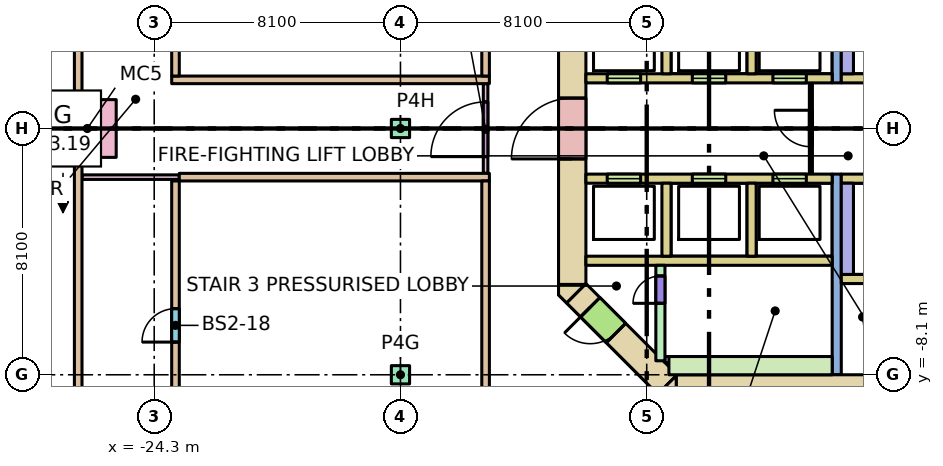
"""IFC4 building model, lengths in metres.
Left out: names, types, materials, properties, quantities, classifications, styles, units other than length and angle.
Written with IfcOpenShell. Run it as: python <this file> out.ifc"""

import sys

from ifc_helpers import new_model, si_unit, direction, frame, frame_2d, origin, origin_2d, place, context, subcontext, project, spatial, polyline, rectangle, outline, extrude, element, fill, save


model = new_model("IFC4")
c1 = context("Model", 3, precision=1e-05, world=origin(), true_north=direction((0.0, 1.0)))
c2 = subcontext(c1, "Body", "Model", "MODEL_VIEW")
j1 = project(units=[si_unit("LENGTHUNIT", "METRE"), si_unit("PLANEANGLEUNIT", "RADIAN")], contexts=[c1])
p1 = place(None, origin())
s1 = spatial("IfcSite", under=j1, at=p1, CompositionType="ELEMENT")
p2 = place(p1, origin())
s2 = spatial("IfcBuilding", under=s1, at=p2, CompositionType="ELEMENT")
p3 = place(p2, frame((0.0, 0.0, -7.2)))
s3 = spatial("IfcBuildingStorey", under=s2, at=p3, CompositionType="ELEMENT", Elevation=-7.2)
for number, where, z_axis, x_axis in (
    (1, (-16.2, -8.1, 0.0), (0.0, 0.0, 1.0), (1.0, 0.0, 0.0)),
    (2, (-16.2, 0.0, 0.0), (0.0, 0.0, 1.0), (1.0, 0.0, 0.0)),
):
    element("IfcColumn", number, at=place(p3, frame(where, z_axis=z_axis, x_axis=x_axis)), inside=s3, PredefinedType="COLUMN", context=c2, shape_type="SweptSolid", body=[
        extrude(rectangle(XDim=0.6, YDim=0.6, at=origin_2d()), origin(), (0.0, 0.0, 1.0), 3.6),
    ])
p4 = place(p3, frame((-26.5, 0.0, 0.0), z_axis=(0.0, 0.0, 1.0), x_axis=(0.0, -1.0, 0.0)))
e3 = element("IfcColumn", 3, at=p4, inside=s3, PredefinedType="COLUMN", context=c2, shape_type="SweptSolid", body=[
    extrude(rectangle(XDim=1.9, YDim=1.9, at=origin_2d()), origin(), (0.0, 0.0, 1.0), 3.6),
])
p5 = place(p3, frame((-7.13, -8.55, -0.32), z_axis=(0.0, 0.0, 1.0), x_axis=(1.0, 0.0, 0.0)))
e4 = element("IfcWall", 4, at=p5, inside=s3, PredefinedType="SHEAR", context=c2, shape_type="SweptSolid", body=[
    extrude(rectangle(XDim=14.26, YDim=0.9, at=frame_2d((7.13, 0.0))), origin(), (0.0, 0.0, 1.0), 3.6),
])
p6 = place(p5, frame((8.08, 0.0, 0.32)))
e5 = element("IfcOpeningElement", 5, at=p6, cuts=e4, PredefinedType="OPENING", context=c2, shape_type="SweptSolid", body=[
    extrude(rectangle(XDim=0.7, YDim=2.1, at=frame_2d((0.35, 1.05))), frame((0.0, 0.46, 0.0), z_axis=(0.0, -1.0, 0.0), x_axis=(1.0, 0.0, 0.0)), (0.0, 0.0, 1.0), 0.92),
])
p7 = place(p5, frame((6.205, 0.0, 0.32)))
e6 = element("IfcOpeningElement", 6, at=p7, cuts=e4, PredefinedType="OPENING", context=c2, shape_type="SweptSolid", body=[
    extrude(rectangle(XDim=0.9, YDim=2.1, at=frame_2d((0.45, 1.05))), frame((0.0, 0.46, 0.0), z_axis=(0.0, -1.0, 0.0), x_axis=(1.0, 0.0, 0.0)), (0.0, 0.0, 1.0), 0.92),
])
p8 = place(p5, frame((10.667, 0.0, 0.32)))
e7 = element("IfcOpeningElement", 7, at=p8, cuts=e4, PredefinedType="OPENING", context=c2, shape_type="SweptSolid", body=[
    extrude(rectangle(XDim=0.9, YDim=2.1, at=frame_2d((0.45, 1.05))), frame((0.0, 0.46, 0.0), z_axis=(0.0, -1.0, 0.0), x_axis=(1.0, 0.0, 0.0)), (0.0, 0.0, 1.0), 0.92),
])
p9 = place(p3, frame((-10.55, -5.13, -0.32), z_axis=(0.0, 0.0, 1.0), x_axis=(0.0, 1.0, 0.0)))
e8 = element("IfcWall", 8, at=p9, inside=s3, PredefinedType="SHEAR", context=c2, shape_type="SweptSolid", body=[
    extrude(rectangle(XDim=10.26, YDim=0.9, at=frame_2d((5.13, 0.0))), origin(), (0.0, 0.0, 1.0), 3.6),
])
p10 = place(p9, frame((4.13, 0.0, 0.32)))
e9 = element("IfcOpeningElement", 9, at=p10, cuts=e8, PredefinedType="OPENING", context=c2, shape_type="SweptSolid", body=[
    extrude(rectangle(XDim=2.0, YDim=2.1, at=frame_2d((1.0, 1.05))), frame((0.0, 0.46, 0.0), z_axis=(0.0, -1.0, 0.0), x_axis=(1.0, 0.0, 0.0)), (0.0, 0.0, 1.0), 0.92),
])
p11 = place(p3, frame((-7.418, -8.418, -0.32), z_axis=(0.0, 0.0, 1.0), x_axis=(-0.707106781187, 0.707106781187, 0.0)))
e10 = element("IfcWall", 10, at=p11, inside=s3, PredefinedType="SHEAR", context=c2, shape_type="SweptSolid", body=[
    extrude(rectangle(XDim=4.243, YDim=0.9, at=frame_2d((2.121, 0.0))), origin(), (0.0, 0.0, 1.0), 3.6),
])
p12 = place(p11, frame((2.393, 0.0, 0.32)))
e11 = element("IfcOpeningElement", 11, at=p12, cuts=e10, PredefinedType="OPENING", context=c2, shape_type="SweptSolid", body=[
    extrude(rectangle(XDim=1.2, YDim=2.1, at=frame_2d((0.6, 1.05))), frame((0.0, 0.46, 0.0), z_axis=(0.0, -1.0, 0.0), x_axis=(1.0, 0.0, 0.0)), (0.0, 0.0, 1.0), 0.92),
])
p13 = place(p3, frame((0.0, 0.0, -0.32)))
e12 = element("IfcWall", 12, at=p13, inside=s3, PredefinedType="SHEAR", context=c2, shape_type="SweptSolid", body=[
    extrude(outline(polyline([(-7.473, -9.0), (-7.736, -8.736), (-7.13, -8.13), (-7.13, -9.0), (-7.473, -9.0)])), origin(), (0.0, 0.0, 1.0), 3.6),
])
p14 = place(p3, frame((0.0, 0.0, -0.32)))
e13 = element("IfcWall", 13, at=p14, inside=s3, PredefinedType="SHEAR", context=c2, shape_type="SweptSolid", body=[
    extrude(outline(polyline([(-11.0, -5.473), (-11.0, -5.13), (-10.13, -5.13), (-10.736, -5.736), (-11.0, -5.473)])), origin(), (0.0, 0.0, 1.0), 3.6),
])
p15 = place(p3, frame((-10.1, -4.35, 0.0), z_axis=(0.0, 0.0, 1.0), x_axis=(1.0, 0.0, 0.0)))
e14 = element("IfcWall", 14, at=p15, inside=s3, PredefinedType="SOLIDWALL", context=c2, shape_type="SweptSolid", body=[
    extrude(rectangle(XDim=8.1, YDim=0.3, at=frame_2d((4.05, 0.0))), origin(), (0.0, 0.0, 1.0), 3.28),
])
p16 = place(p3, frame((-10.1, 1.65, 0.0), z_axis=(0.0, 0.0, 1.0), x_axis=(1.0, 0.0, 0.0)))
e15 = element("IfcWall", 15, at=p16, inside=s3, PredefinedType="SOLIDWALL", context=c2, shape_type="SweptSolid", body=[
    extrude(rectangle(XDim=8.1, YDim=0.3, at=frame_2d((4.05, 0.0))), origin(), (0.0, 0.0, 1.0), 3.28),
])
p17 = place(p16, frame((0.7, 0.0, 0.0)))
e16 = element("IfcOpeningElement", 16, at=p17, cuts=e15, PredefinedType="OPENING", context=c2, shape_type="SweptSolid", body=[
    extrude(rectangle(XDim=1.1, YDim=2.1, at=frame_2d((0.55, 1.05))), frame((0.0, 0.16, 0.0), z_axis=(0.0, -1.0, 0.0), x_axis=(1.0, 0.0, 0.0)), (0.0, 0.0, 1.0), 0.32),
])
p18 = place(p16, frame((3.5, 0.0, 0.0)))
e17 = element("IfcOpeningElement", 17, at=p18, cuts=e15, PredefinedType="OPENING", context=c2, shape_type="SweptSolid", body=[
    extrude(rectangle(XDim=1.1, YDim=2.1, at=frame_2d((0.55, 1.05))), frame((0.0, 0.16, 0.0), z_axis=(0.0, -1.0, 0.0), x_axis=(1.0, 0.0, 0.0)), (0.0, 0.0, 1.0), 0.32),
])
p19 = place(p16, frame((6.15, 0.0, 0.0)))
e18 = element("IfcOpeningElement", 18, at=p19, cuts=e15, PredefinedType="OPENING", context=c2, shape_type="SweptSolid", body=[
    extrude(rectangle(XDim=1.1, YDim=2.1, at=frame_2d((0.55, 1.05))), frame((0.0, 0.16, 0.0), z_axis=(0.0, -1.0, 0.0), x_axis=(1.0, 0.0, 0.0)), (0.0, 0.0, 1.0), 0.32),
])
p20 = place(p3, frame((-10.1, -1.65, 0.0), z_axis=(0.0, 0.0, 1.0), x_axis=(1.0, 0.0, 0.0)))
e19 = element("IfcWall", 19, at=p20, inside=s3, PredefinedType="SOLIDWALL", context=c2, shape_type="SweptSolid", body=[
    extrude(rectangle(XDim=8.1, YDim=0.3, at=frame_2d((4.05, 0.0))), origin(), (0.0, 0.0, 1.0), 3.28),
])
p21 = place(p20, frame((0.7, 0.0, 0.0)))
e20 = element("IfcOpeningElement", 20, at=p21, cuts=e19, PredefinedType="OPENING", context=c2, shape_type="SweptSolid", body=[
    extrude(rectangle(XDim=1.1, YDim=2.1, at=frame_2d((0.55, 1.05))), frame((0.0, 0.16, 0.0), z_axis=(0.0, -1.0, 0.0), x_axis=(1.0, 0.0, 0.0)), (0.0, 0.0, 1.0), 0.32),
])
p22 = place(p20, frame((3.5, 0.0, 0.0)))
e21 = element("IfcOpeningElement", 21, at=p22, cuts=e19, PredefinedType="OPENING", context=c2, shape_type="SweptSolid", body=[
    extrude(rectangle(XDim=1.1, YDim=2.1, at=frame_2d((0.55, 1.05))), frame((0.0, 0.16, 0.0), z_axis=(0.0, -1.0, 0.0), x_axis=(1.0, 0.0, 0.0)), (0.0, 0.0, 1.0), 0.32),
])
p23 = place(p20, frame((6.15, 0.0, 0.0)))
e22 = element("IfcOpeningElement", 22, at=p23, cuts=e19, PredefinedType="OPENING", context=c2, shape_type="SweptSolid", body=[
    extrude(rectangle(XDim=1.1, YDim=2.1, at=frame_2d((0.55, 1.05))), frame((0.0, 0.16, 0.0), z_axis=(0.0, -1.0, 0.0), x_axis=(1.0, 0.0, 0.0)), (0.0, 0.0, 1.0), 0.32),
])
for number, where, z_axis, x_axis in (
    (23, (-7.45, 1.8, 0.0), (0.0, 0.0, 1.0), (0.0, 1.0, 0.0)),
    (24, (-7.45, -4.2, 0.0), (0.0, 0.0, 1.0), (0.0, 1.0, 0.0)),
    (25, (-4.65, 1.8, 0.0), (0.0, 0.0, 1.0), (0.0, 1.0, 0.0)),
    (26, (-4.65, -4.2, 0.0), (0.0, 0.0, 1.0), (0.0, 1.0, 0.0)),
):
    element("IfcWall", number, at=place(p3, frame(where, z_axis=z_axis, x_axis=x_axis)), inside=s3, PredefinedType="SOLIDWALL", context=c2, shape_type="SweptSolid", body=[
        extrude(rectangle(XDim=2.4, YDim=0.3, at=frame_2d((1.2, 0.0))), origin(), (0.0, 0.0, 1.0), 3.28),
    ])
for number, where, z_axis, x_axis in (
    (27, (-1.85, 1.5, 0.0), (0.0, 0.0, 1.0), (0.0, 1.0, 0.0)),
    (28, (-1.85, -8.1, 0.0), (0.0, 0.0, 1.0), (0.0, 1.0, 0.0)),
):
    element("IfcWall", number, at=place(p3, frame(where, z_axis=z_axis, x_axis=x_axis)), inside=s3, PredefinedType="SHEAR", context=c2, shape_type="SweptSolid", body=[
        extrude(rectangle(XDim=6.6, YDim=0.3, at=frame_2d((3.3, 0.0))), origin(), (0.0, 0.0, 1.0), 3.28),
    ])
p24 = place(p3, frame((-1.7, 1.65, 0.0), z_axis=(0.0, 0.0, 1.0), x_axis=(1.0, 0.0, 0.0)))
e29 = element("IfcWall", 29, at=p24, inside=s3, PredefinedType="SOLIDWALL", context=c2, shape_type="SweptSolid", body=[
    extrude(rectangle(XDim=3.4, YDim=0.3, at=frame_2d((1.7, 0.0))), origin(), (0.0, 0.0, 1.0), 3.28),
])
p25 = place(p24, frame((1.15, 0.0, 0.0)))
e30 = element("IfcOpeningElement", 30, at=p25, cuts=e29, PredefinedType="OPENING", context=c2, shape_type="SweptSolid", body=[
    extrude(rectangle(XDim=1.1, YDim=2.1, at=frame_2d((0.55, 1.05))), frame((0.0, 0.16, 0.0), z_axis=(0.0, -1.0, 0.0), x_axis=(1.0, 0.0, 0.0)), (0.0, 0.0, 1.0), 0.32),
])
p26 = place(p3, frame((-1.7, -1.65, 0.0), z_axis=(0.0, 0.0, 1.0), x_axis=(1.0, 0.0, 0.0)))
e31 = element("IfcWall", 31, at=p26, inside=s3, PredefinedType="SOLIDWALL", context=c2, shape_type="SweptSolid", body=[
    extrude(rectangle(XDim=3.4, YDim=0.3, at=frame_2d((1.7, 0.0))), origin(), (0.0, 0.0, 1.0), 3.28),
])
p27 = place(p26, frame((1.15, 0.0, 0.0)))
e32 = element("IfcOpeningElement", 32, at=p27, cuts=e31, PredefinedType="OPENING", context=c2, shape_type="SweptSolid", body=[
    extrude(rectangle(XDim=1.1, YDim=2.1, at=frame_2d((0.55, 1.05))), frame((0.0, 0.16, 0.0), z_axis=(0.0, -1.0, 0.0), x_axis=(1.0, 0.0, 0.0)), (0.0, 0.0, 1.0), 0.32),
])
for number, where, z_axis, x_axis in (
    (33, (-1.5, 1.8, 0.0), (0.0, 0.0, 1.0), (0.0, 1.0, 0.0)),
    (34, (-1.5, -4.8, 0.0), (0.0, 0.0, 1.0), (0.0, 1.0, 0.0)),
):
    element("IfcWall", number, at=place(p3, frame(where, z_axis=z_axis, x_axis=x_axis)), inside=s3, PredefinedType="SOLIDWALL", context=c2, shape_type="SweptSolid", body=[
        extrude(rectangle(XDim=3.0, YDim=0.4, at=frame_2d((1.5, 0.0))), origin(), (0.0, 0.0, 1.0), 3.28),
    ])
p28 = place(p3, frame((-1.7, -4.95, 0.0), z_axis=(0.0, 0.0, 1.0), x_axis=(1.0, 0.0, 0.0)))
e35 = element("IfcWall", 35, at=p28, inside=s3, PredefinedType="SOLIDWALL", context=c2, shape_type="SweptSolid", body=[
    extrude(rectangle(XDim=3.4, YDim=0.3, at=frame_2d((1.7, 0.0))), origin(), (0.0, 0.0, 1.0), 3.28),
])
p29 = place(p3, frame((-7.65, -7.64, 0.0), z_axis=(0.0, 0.0, 1.0), x_axis=(0.0, 1.0, 0.0)))
e36 = element("IfcWall", 36, at=p29, inside=s3, PredefinedType="SHEAR", context=c2, shape_type="SweptSolid", body=[
    extrude(rectangle(XDim=3.14, YDim=0.3, at=frame_2d((1.57, 0.0))), origin(), (0.0, 0.0, 1.0), 3.28),
])
p30 = place(p29, frame((1.89, 0.0, 0.0)))
e37 = element("IfcOpeningElement", 37, at=p30, cuts=e36, PredefinedType="OPENING", context=c2, shape_type="SweptSolid", body=[
    extrude(rectangle(XDim=0.9, YDim=2.1, at=frame_2d((0.45, 1.05))), frame((0.0, 0.16, 0.0), z_axis=(0.0, -1.0, 0.0), x_axis=(1.0, 0.0, 0.0)), (0.0, 0.0, 1.0), 0.32),
])
p31 = place(p3, frame((-7.5, -7.6, 0.0), z_axis=(0.0, 0.0, 1.0), x_axis=(1.0, 0.0, 0.0)))
e38 = element("IfcWall", 38, at=p31, inside=s3, PredefinedType="SHEAR", context=c2, shape_type="SweptSolid", body=[
    extrude(rectangle(XDim=0.6, YDim=0.2, at=frame_2d((0.3, 0.0))), origin(), (0.0, 0.0, 1.0), 3.28),
])
p32 = place(p3, frame((-7.37, -7.8, 0.0), z_axis=(0.0, 0.0, 1.0), x_axis=(1.0, 0.0, 0.0)))
e39 = element("IfcWall", 39, at=p32, inside=s3, PredefinedType="SHEAR", context=c2, shape_type="SweptSolid", body=[
    extrude(rectangle(XDim=5.37, YDim=0.6, at=frame_2d((2.685, 0.0))), origin(), (0.0, 0.0, 1.0), 3.28),
])
p33 = place(p3, frame((-2.7, -1.5, 0.0), z_axis=(0.0, 0.0, 1.0), x_axis=(0.0, 1.0, 0.0)))
e40 = element("IfcWall", 40, at=p33, inside=s3, PredefinedType="PARTITIONING", context=c2, shape_type="SweptSolid", body=[
    extrude(rectangle(XDim=3.0, YDim=0.1, at=frame_2d((1.5, 0.0))), origin(), (0.0, 0.0, 1.0), 3.28),
])
p34 = place(p33, frame((0.9, 0.0, 0.0)))
e41 = element("IfcOpeningElement", 41, at=p34, cuts=e40, PredefinedType="OPENING", context=c2, shape_type="SweptSolid", body=[
    extrude(rectangle(XDim=1.2, YDim=2.1, at=frame_2d((0.6, 1.05))), frame((0.0, 0.06, 0.0), z_axis=(0.0, -1.0, 0.0), x_axis=(1.0, 0.0, 0.0)), (0.0, 0.0, 1.0), 0.12),
])
p35 = place(p3, frame((-26.675, -1.6, 0.0), z_axis=(0.0, 0.0, 1.0), x_axis=(1.0, 0.0, 0.0)))
e42 = element("IfcWall", 42, at=p35, inside=s3, PredefinedType="PARTITIONING", context=c2, shape_type="SweptSolid", body=[
    extrude(rectangle(XDim=3.2, YDim=0.15, at=frame_2d((1.6, 0.0))), origin(), (0.0, 0.0, 1.0), 3.28),
])
p36 = place(p3, frame((-26.8, -23.875, 0.0), z_axis=(0.0, 0.0, 1.0), x_axis=(0.0, 1.0, 0.0)))
e43 = element("IfcWall", 43, at=p36, inside=s3, PredefinedType="PARTITIONING", context=c2, shape_type="SweptSolid", body=[
    extrude(rectangle(XDim=22.915, YDim=0.25, at=frame_2d((11.458, 0.0))), origin(), (0.0, 0.0, 1.0), 3.28),
])
p37 = place(p3, frame((-23.6, -11.275, 0.0), z_axis=(0.0, 0.0, 1.0), x_axis=(0.0, 1.0, 0.0)))
e44 = element("IfcWall", 44, at=p37, inside=s3, PredefinedType="PARTITIONING", context=c2, shape_type="SweptSolid", body=[
    extrude(rectangle(XDim=9.55, YDim=0.25, at=frame_2d((4.775, 0.0))), origin(), (0.0, 0.0, 1.0), 3.28),
])
p38 = place(p37, frame((4.25, 0.0, 0.0)))
e45 = element("IfcOpeningElement", 45, at=p38, cuts=e44, PredefinedType="OPENING", context=c2, shape_type="SweptSolid", body=[
    extrude(rectangle(XDim=1.1, YDim=2.1, at=frame_2d((0.55, 1.05))), frame((0.0, 0.135, 0.0), z_axis=(0.0, -1.0, 0.0), x_axis=(1.0, 0.0, 0.0)), (0.0, 0.0, 1.0), 0.27),
])
p39 = place(p3, frame((-13.4, -1.475, 0.0), z_axis=(0.0, 0.0, 1.0), x_axis=(0.0, 1.0, 0.0)))
e46 = element("IfcWall", 46, at=p39, inside=s3, PredefinedType="PARTITIONING", context=c2, shape_type="SweptSolid", body=[
    extrude(rectangle(XDim=2.95, YDim=0.15, at=frame_2d((1.475, 0.0))), origin(), (0.0, 0.0, 1.0), 3.28),
])
p40 = place(p39, frame((0.55, 0.0, 0.0)))
e47 = element("IfcOpeningElement", 47, at=p40, cuts=e46, PredefinedType="OPENING", context=c2, shape_type="SweptSolid", body=[
    extrude(rectangle(XDim=1.8, YDim=2.4, at=frame_2d((0.9, 1.2))), frame((0.0, 0.085, 0.0), z_axis=(0.0, -1.0, 0.0), x_axis=(1.0, 0.0, 0.0)), (0.0, 0.0, 1.0), 0.17),
])
p41 = place(p3, frame((-26.8, 0.96, 0.0), z_axis=(0.0, 0.0, 1.0), x_axis=(0.0, 1.0, 0.0)))
e48 = element("IfcWall", 48, at=p41, inside=s3, PredefinedType="PARTITIONING", context=c2, shape_type="SweptSolid", body=[
    extrude(rectangle(XDim=22.915, YDim=0.25, at=frame_2d((11.458, 0.0))), origin(), (0.0, 0.0, 1.0), 3.28),
])
p42 = place(p41, frame((11.19, 0.0, 0.0)))
e49 = element("IfcOpeningElement", 49, at=p42, cuts=e48, PredefinedType="OPENING", context=c2, shape_type="SweptSolid", body=[
    extrude(rectangle(XDim=1.1, YDim=2.1, at=frame_2d((0.55, 1.05))), frame((0.0, 0.135, 0.0), z_axis=(0.0, -1.0, 0.0), x_axis=(1.0, 0.0, 0.0)), (0.0, 0.0, 1.0), 0.27),
])
p43 = place(p3, frame((-23.725, 1.6, 0.0), z_axis=(0.0, 0.0, 1.0), x_axis=(1.0, 0.0, 0.0)))
e50 = element("IfcWall", 50, at=p43, inside=s3, PredefinedType="PARTITIONING", context=c2, shape_type="SweptSolid", body=[
    extrude(rectangle(XDim=10.45, YDim=0.25, at=frame_2d((5.225, 0.0))), origin(), (0.0, 0.0, 1.0), 3.28),
])
p44 = place(p3, frame((-23.475, -1.6, 0.0), z_axis=(0.0, 0.0, 1.0), x_axis=(1.0, 0.0, 0.0)))
e51 = element("IfcWall", 51, at=p44, inside=s3, PredefinedType="PARTITIONING", context=c2, shape_type="SweptSolid", body=[
    extrude(rectangle(XDim=10.2, YDim=0.25, at=frame_2d((5.1, 0.0))), origin(), (0.0, 0.0, 1.0), 3.28),
])
p45 = place(p3, frame((-23.6, 1.725, 0.0), z_axis=(0.0, 0.0, 1.0), x_axis=(0.0, 1.0, 0.0)))
e52 = element("IfcWall", 52, at=p45, inside=s3, PredefinedType="PARTITIONING", context=c2, shape_type="SweptSolid", body=[
    extrude(rectangle(XDim=9.55, YDim=0.25, at=frame_2d((4.775, 0.0))), origin(), (0.0, 0.0, 1.0), 3.28),
])
for number, where, z_axis, x_axis in (
    (53, (-13.4, 1.725, 0.0), (0.0, 0.0, 1.0), (0.0, 1.0, 0.0)),
    (54, (-13.4, -19.275, 0.0), (0.0, 0.0, 1.0), (0.0, 1.0, 0.0)),
):
    element("IfcWall", number, at=place(p3, frame(where, z_axis=z_axis, x_axis=x_axis)), inside=s3, PredefinedType="PARTITIONING", context=c2, shape_type="SweptSolid", body=[
        extrude(rectangle(XDim=17.55, YDim=0.25, at=frame_2d((8.775, 0.0))), origin(), (0.0, 0.0, 1.0), 3.28),
    ])
p46 = place(p3, frame((-32.09, 0.0, 0.0), z_axis=(0.0, 0.0, 1.0), x_axis=(1.0, 0.0, 0.0)))
e55 = element("IfcWall", 55, at=p46, inside=s3, PredefinedType="PARTITIONING", context=c2, shape_type="SweptSolid", body=[
    extrude(rectangle(XDim=4.63, YDim=0.25, at=frame_2d((2.315, 0.0))), origin(), (0.0, 0.0, 1.0), 3.28),
])
p47 = place(p17, origin())
e56 = element("IfcDoor", 56, at=p47, inside=s3, OperationType="DOUBLE_DOOR_SLIDING", PredefinedType="DOOR", context=c2, shape_type="SweptSolid", body=[
    extrude(rectangle(XDim=1.1, YDim=2.1, at=frame_2d((0.55, 1.05))), frame((0.0, 0.025, 0.0), z_axis=(0.0, -1.0, 0.0), x_axis=(1.0, 0.0, 0.0)), (0.0, 0.0, 1.0), 0.05),
])
fill(e16, e56)
p48 = place(p18, origin())
e57 = element("IfcDoor", 57, at=p48, inside=s3, OperationType="DOUBLE_DOOR_SLIDING", PredefinedType="DOOR", context=c2, shape_type="SweptSolid", body=[
    extrude(rectangle(XDim=1.1, YDim=2.1, at=frame_2d((0.55, 1.05))), frame((0.0, 0.025, 0.0), z_axis=(0.0, -1.0, 0.0), x_axis=(1.0, 0.0, 0.0)), (0.0, 0.0, 1.0), 0.05),
])
fill(e17, e57)
p49 = place(p19, origin())
e58 = element("IfcDoor", 58, at=p49, inside=s3, OperationType="DOUBLE_DOOR_SLIDING", PredefinedType="DOOR", context=c2, shape_type="SweptSolid", body=[
    extrude(rectangle(XDim=1.1, YDim=2.1, at=frame_2d((0.55, 1.05))), frame((0.0, 0.025, 0.0), z_axis=(0.0, -1.0, 0.0), x_axis=(1.0, 0.0, 0.0)), (0.0, 0.0, 1.0), 0.05),
])
fill(e18, e58)
p50 = place(p21, origin())
e59 = element("IfcDoor", 59, at=p50, inside=s3, OperationType="DOUBLE_DOOR_SLIDING", PredefinedType="DOOR", context=c2, shape_type="SweptSolid", body=[
    extrude(rectangle(XDim=1.1, YDim=2.1, at=frame_2d((0.55, 1.05))), frame((0.0, 0.025, 0.0), z_axis=(0.0, -1.0, 0.0), x_axis=(1.0, 0.0, 0.0)), (0.0, 0.0, 1.0), 0.05),
])
fill(e20, e59)
p51 = place(p22, origin())
e60 = element("IfcDoor", 60, at=p51, inside=s3, OperationType="DOUBLE_DOOR_SLIDING", PredefinedType="DOOR", context=c2, shape_type="SweptSolid", body=[
    extrude(rectangle(XDim=1.1, YDim=2.1, at=frame_2d((0.55, 1.05))), frame((0.0, 0.025, 0.0), z_axis=(0.0, -1.0, 0.0), x_axis=(1.0, 0.0, 0.0)), (0.0, 0.0, 1.0), 0.05),
])
fill(e21, e60)
p52 = place(p23, origin())
e61 = element("IfcDoor", 61, at=p52, inside=s3, OperationType="DOUBLE_DOOR_SLIDING", PredefinedType="DOOR", context=c2, shape_type="SweptSolid", body=[
    extrude(rectangle(XDim=1.1, YDim=2.1, at=frame_2d((0.55, 1.05))), frame((0.0, 0.025, 0.0), z_axis=(0.0, -1.0, 0.0), x_axis=(1.0, 0.0, 0.0)), (0.0, 0.0, 1.0), 0.05),
])
fill(e22, e61)
p53 = place(p30, origin())
e62 = element("IfcDoor", 62, at=p53, inside=s3, OperationType="SINGLE_SWING_LEFT", PredefinedType="DOOR", context=c2, shape_type="SweptSolid", body=[
    extrude(rectangle(XDim=0.9, YDim=2.1, at=frame_2d((0.45, 1.05))), frame((0.0, 0.025, 0.0), z_axis=(0.0, -1.0, 0.0), x_axis=(1.0, 0.0, 0.0)), (0.0, 0.0, 1.0), 0.05),
])
fill(e37, e62)
p54 = place(p12, origin())
e63 = element("IfcDoor", 63, at=p54, inside=s3, OperationType="SINGLE_SWING_RIGHT", PredefinedType="DOOR", context=c2, shape_type="SweptSolid", body=[
    extrude(rectangle(XDim=1.2, YDim=2.1, at=frame_2d((0.6, 1.05))), frame((0.0, 0.025, 0.0), z_axis=(0.0, -1.0, 0.0), x_axis=(1.0, 0.0, 0.0)), (0.0, 0.0, 1.0), 0.05),
])
fill(e11, e63)
p55 = place(p10, origin())
e64 = element("IfcDoor", 64, at=p55, inside=s3, OperationType="DOUBLE_DOOR_SINGLE_SWING", PredefinedType="DOOR", context=c2, shape_type="SweptSolid", body=[
    extrude(rectangle(XDim=2.0, YDim=2.1, at=frame_2d((1.0, 1.05))), frame((0.0, 0.025, 0.0), z_axis=(0.0, -1.0, 0.0), x_axis=(1.0, 0.0, 0.0)), (0.0, 0.0, 1.0), 0.05),
])
fill(e9, e64)
p56 = place(p34, origin())
e65 = element("IfcDoor", 65, at=p56, inside=s3, OperationType="SINGLE_SWING_RIGHT", PredefinedType="DOOR", context=c2, shape_type="SweptSolid", body=[
    extrude(rectangle(XDim=1.2, YDim=2.1, at=frame_2d((0.6, 1.05))), frame((0.0, 0.025, 0.0), z_axis=(0.0, -1.0, 0.0), x_axis=(1.0, 0.0, 0.0)), (0.0, 0.0, 1.0), 0.05),
])
fill(e41, e65)
p57 = place(p38, origin())
e66 = element("IfcDoor", 66, at=p57, inside=s3, OperationType="SINGLE_SWING_LEFT", PredefinedType="DOOR", context=c2, shape_type="SweptSolid", body=[
    extrude(rectangle(XDim=1.1, YDim=2.1, at=frame_2d((0.55, 1.05))), frame((0.0, 0.025, 0.0), z_axis=(0.0, -1.0, 0.0), x_axis=(1.0, 0.0, 0.0)), (0.0, 0.0, 1.0), 0.05),
])
fill(e45, e66)
p58 = place(p40, origin())
e67 = element("IfcDoor", 67, at=p58, inside=s3, OperationType="SINGLE_SWING_LEFT", PredefinedType="DOOR", context=c2, shape_type="SweptSolid", body=[
    extrude(rectangle(XDim=1.8, YDim=2.4, at=frame_2d((0.9, 1.2))), frame((0.0, 0.025, 0.0), z_axis=(0.0, -1.0, 0.0), x_axis=(1.0, 0.0, 0.0)), (0.0, 0.0, 1.0), 0.05),
])
fill(e47, e67)
save(model, sys.argv[1])
